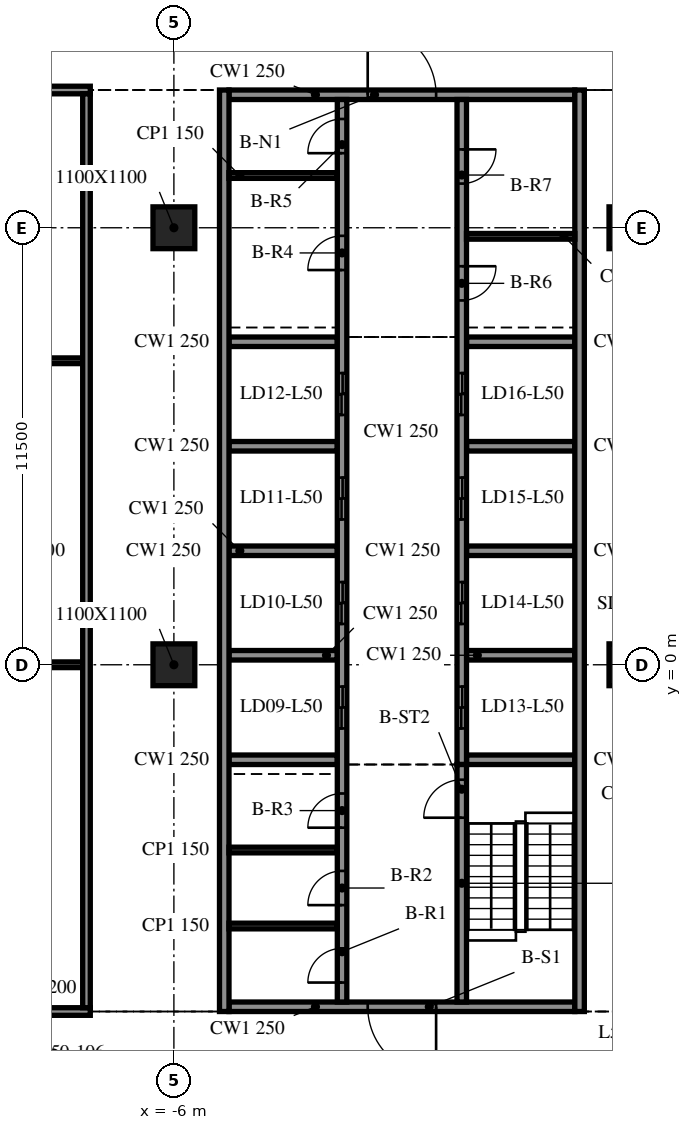
"""IFC4 building model, lengths in metres.
Left out: names, types, materials, properties, quantities, classifications, styles, units other than length and angle.
Written with IfcOpenShell. Run it as: python <this file> out.ifc"""

import sys

from ifc_helpers import new_model, si_unit, direction, frame, frame_2d, origin, origin_2d, place, context, subcontext, project, spatial, rectangle, extrude, element, fill, save


model = new_model("IFC4")
c1 = context("Model", 3, precision=1e-05, world=origin(), true_north=direction((0.0, 1.0)))
c2 = subcontext(c1, "Body", "Model", "MODEL_VIEW")
j1 = project(units=[si_unit("LENGTHUNIT", "METRE"), si_unit("PLANEANGLEUNIT", "RADIAN")], contexts=[c1])
p1 = place(None, origin())
s1 = spatial("IfcSite", under=j1, at=p1, CompositionType="ELEMENT")
p2 = place(p1, origin())
s2 = spatial("IfcBuilding", under=s1, at=p2, CompositionType="ELEMENT")
p3 = place(p2, frame((0.0, 0.0, 209.1)))
s3 = spatial("IfcBuildingStorey", under=s2, at=p3, CompositionType="ELEMENT", Elevation=209.1)
for number, where, z_axis, x_axis in (
    (1, (-6.0, 0.0, -0.34), (0.0, 0.0, 1.0), (1.0, 0.0, 0.0)),
    (2, (-6.0, 11.5, -0.34), (0.0, 0.0, 1.0), (1.0, 0.0, 0.0)),
    (3, (6.0, 0.0, -0.34), (0.0, 0.0, 1.0), (1.0, 0.0, 0.0)),
    (4, (6.0, 11.5, -0.34), (0.0, 0.0, 1.0), (1.0, 0.0, 0.0)),
):
    element("IfcColumn", number, at=place(p3, frame(where, z_axis=z_axis, x_axis=x_axis)), inside=s3, PredefinedType="COLUMN", context=c2, shape_type="SweptSolid", body=[
        extrude(rectangle(XDim=1.1, YDim=1.1, at=origin_2d()), origin(), (0.0, 0.0, 1.0), 3.8),
    ])
for number, where, z_axis, x_axis in (
    (5, (-4.675, 15.125, 0.0), (0.0, 0.0, 1.0), (0.0, -1.0, 0.0)),
    (6, (4.675, -9.125, 0.0), (0.0, 0.0, 1.0), (0.0, 1.0, 0.0)),
):
    element("IfcWall", number, at=place(p3, frame(where, z_axis=z_axis, x_axis=x_axis)), inside=s3, PredefinedType="SOLIDWALL", context=c2, shape_type="SweptSolid", body=[
        extrude(rectangle(XDim=24.25, YDim=0.25, at=frame_2d((12.125, 0.0))), origin(), (0.0, 0.0, 1.0), 3.46),
    ])
p4 = place(p3, frame((4.55, -9.0, 0.0), z_axis=(0.0, 0.0, 1.0), x_axis=(-1.0, 0.0, 0.0)))
e7 = element("IfcWall", 7, at=p4, inside=s3, PredefinedType="SOLIDWALL", context=c2, shape_type="SweptSolid", body=[
    extrude(rectangle(XDim=9.1, YDim=0.25, at=frame_2d((4.55, 0.0))), origin(), (0.0, 0.0, 1.0), 3.46),
])
p5 = place(p4, frame((3.65, 0.0, 0.0)))
e8 = element("IfcOpeningElement", 8, at=p5, cuts=e7, PredefinedType="OPENING", context=c2, shape_type="SweptSolid", body=[
    extrude(rectangle(XDim=1.8, YDim=2.1, at=frame_2d((0.9, 1.05))), frame((0.0, 0.135, 0.0), z_axis=(0.0, -1.0, 0.0), x_axis=(1.0, 0.0, 0.0)), (0.0, 0.0, 1.0), 0.27),
])
p6 = place(p3, frame((-4.55, 15.0, 0.0), z_axis=(0.0, 0.0, 1.0), x_axis=(1.0, 0.0, 0.0)))
e9 = element("IfcWall", 9, at=p6, inside=s3, PredefinedType="SOLIDWALL", context=c2, shape_type="SweptSolid", body=[
    extrude(rectangle(XDim=9.1, YDim=0.25, at=frame_2d((4.55, 0.0))), origin(), (0.0, 0.0, 1.0), 3.46),
])
p7 = place(p6, frame((3.65, 0.0, 0.0)))
e10 = element("IfcOpeningElement", 10, at=p7, cuts=e9, PredefinedType="OPENING", context=c2, shape_type="SweptSolid", body=[
    extrude(rectangle(XDim=1.8, YDim=2.1, at=frame_2d((0.9, 1.05))), frame((0.0, 0.135, 0.0), z_axis=(0.0, -1.0, 0.0), x_axis=(1.0, 0.0, 0.0)), (0.0, 0.0, 1.0), 0.27),
])
p8 = place(p3, frame((-1.575, -8.875, 0.0), z_axis=(0.0, 0.0, 1.0), x_axis=(0.0, 1.0, 0.0)))
e11 = element("IfcWall", 11, at=p8, inside=s3, PredefinedType="SOLIDWALL", context=c2, shape_type="SweptSolid", body=[
    extrude(rectangle(XDim=23.75, YDim=0.25, at=frame_2d((11.875, 0.0))), origin(), (0.0, 0.0, 1.0), 3.46),
])
p9 = place(p8, frame((7.2, 0.0, 0.0)))
e12 = element("IfcOpeningElement", 12, at=p9, cuts=e11, PredefinedType="OPENING", context=c2, shape_type="SweptSolid", body=[
    extrude(rectangle(XDim=1.1, YDim=2.1, at=frame_2d((0.55, 1.05))), frame((0.0, 0.135, 0.0), z_axis=(0.0, -1.0, 0.0), x_axis=(1.0, 0.0, 0.0)), (0.0, 0.0, 1.0), 0.27),
])
p10 = place(p8, frame((9.95, 0.0, 0.0)))
e13 = element("IfcOpeningElement", 13, at=p10, cuts=e11, PredefinedType="OPENING", context=c2, shape_type="SweptSolid", body=[
    extrude(rectangle(XDim=1.1, YDim=2.1, at=frame_2d((0.55, 1.05))), frame((0.0, 0.135, 0.0), z_axis=(0.0, -1.0, 0.0), x_axis=(1.0, 0.0, 0.0)), (0.0, 0.0, 1.0), 0.27),
])
p11 = place(p8, frame((12.7, 0.0, 0.0)))
e14 = element("IfcOpeningElement", 14, at=p11, cuts=e11, PredefinedType="OPENING", context=c2, shape_type="SweptSolid", body=[
    extrude(rectangle(XDim=1.1, YDim=2.1, at=frame_2d((0.55, 1.05))), frame((0.0, 0.135, 0.0), z_axis=(0.0, -1.0, 0.0), x_axis=(1.0, 0.0, 0.0)), (0.0, 0.0, 1.0), 0.27),
])
p12 = place(p8, frame((15.45, 0.0, 0.0)))
e15 = element("IfcOpeningElement", 15, at=p12, cuts=e11, PredefinedType="OPENING", context=c2, shape_type="SweptSolid", body=[
    extrude(rectangle(XDim=1.1, YDim=2.1, at=frame_2d((0.55, 1.05))), frame((0.0, 0.135, 0.0), z_axis=(0.0, -1.0, 0.0), x_axis=(1.0, 0.0, 0.0)), (0.0, 0.0, 1.0), 0.27),
])
p13 = place(p8, frame((0.512, 0.0, 0.0)))
e16 = element("IfcOpeningElement", 16, at=p13, cuts=e11, PredefinedType="OPENING", context=c2, shape_type="SweptSolid", body=[
    extrude(rectangle(XDim=0.9, YDim=2.1, at=frame_2d((0.45, 1.05))), frame((0.0, 0.135, 0.0), z_axis=(0.0, -1.0, 0.0), x_axis=(1.0, 0.0, 0.0)), (0.0, 0.0, 1.0), 0.27),
])
p14 = place(p8, frame((2.55, 0.0, 0.0)))
e17 = element("IfcOpeningElement", 17, at=p14, cuts=e11, PredefinedType="OPENING", context=c2, shape_type="SweptSolid", body=[
    extrude(rectangle(XDim=0.9, YDim=2.1, at=frame_2d((0.45, 1.05))), frame((0.0, 0.135, 0.0), z_axis=(0.0, -1.0, 0.0), x_axis=(1.0, 0.0, 0.0)), (0.0, 0.0, 1.0), 0.27),
])
p15 = place(p8, frame((4.587, 0.0, 0.0)))
e18 = element("IfcOpeningElement", 18, at=p15, cuts=e11, PredefinedType="OPENING", context=c2, shape_type="SweptSolid", body=[
    extrude(rectangle(XDim=0.9, YDim=2.1, at=frame_2d((0.45, 1.05))), frame((0.0, 0.135, 0.0), z_axis=(0.0, -1.0, 0.0), x_axis=(1.0, 0.0, 0.0)), (0.0, 0.0, 1.0), 0.27),
])
p16 = place(p8, frame((19.262, 0.0, 0.0)))
e19 = element("IfcOpeningElement", 19, at=p16, cuts=e11, PredefinedType="OPENING", context=c2, shape_type="SweptSolid", body=[
    extrude(rectangle(XDim=0.9, YDim=2.1, at=frame_2d((0.45, 1.05))), frame((0.0, 0.135, 0.0), z_axis=(0.0, -1.0, 0.0), x_axis=(1.0, 0.0, 0.0)), (0.0, 0.0, 1.0), 0.27),
])
p17 = place(p8, frame((22.337, 0.0, 0.0)))
e20 = element("IfcOpeningElement", 20, at=p17, cuts=e11, PredefinedType="OPENING", context=c2, shape_type="SweptSolid", body=[
    extrude(rectangle(XDim=0.9, YDim=2.1, at=frame_2d((0.45, 1.05))), frame((0.0, 0.135, 0.0), z_axis=(0.0, -1.0, 0.0), x_axis=(1.0, 0.0, 0.0)), (0.0, 0.0, 1.0), 0.27),
])
p18 = place(p3, frame((1.575, -8.875, 0.0), z_axis=(0.0, 0.0, 1.0), x_axis=(0.0, 1.0, 0.0)))
e21 = element("IfcWall", 21, at=p18, inside=s3, PredefinedType="SOLIDWALL", context=c2, shape_type="SweptSolid", body=[
    extrude(rectangle(XDim=6.25, YDim=0.25, at=frame_2d((3.125, 0.0))), origin(), (0.0, 0.0, 1.0), 3.46),
])
p19 = place(p18, frame((4.85, 0.0, 0.0)))
e22 = element("IfcOpeningElement", 22, at=p19, cuts=e21, PredefinedType="OPENING", context=c2, shape_type="SweptSolid", body=[
    extrude(rectangle(XDim=1.0, YDim=2.1, at=frame_2d((0.5, 1.05))), frame((0.0, 0.135, 0.0), z_axis=(0.0, -1.0, 0.0), x_axis=(1.0, 0.0, 0.0)), (0.0, 0.0, 1.0), 0.27),
])
p20 = place(p3, frame((1.575, 14.875, 0.0), z_axis=(0.0, 0.0, 1.0), x_axis=(0.0, -1.0, 0.0)))
e23 = element("IfcWall", 23, at=p20, inside=s3, PredefinedType="SOLIDWALL", context=c2, shape_type="SweptSolid", body=[
    extrude(rectangle(XDim=17.5, YDim=0.25, at=frame_2d((8.75, 0.0))), origin(), (0.0, 0.0, 1.0), 3.46),
])
p21 = place(p20, frame((15.45, 0.0, 0.0)))
e24 = element("IfcOpeningElement", 24, at=p21, cuts=e23, PredefinedType="OPENING", context=c2, shape_type="SweptSolid", body=[
    extrude(rectangle(XDim=1.1, YDim=2.1, at=frame_2d((0.55, 1.05))), frame((0.0, 0.135, 0.0), z_axis=(0.0, -1.0, 0.0), x_axis=(1.0, 0.0, 0.0)), (0.0, 0.0, 1.0), 0.27),
])
p22 = place(p20, frame((12.7, 0.0, 0.0)))
e25 = element("IfcOpeningElement", 25, at=p22, cuts=e23, PredefinedType="OPENING", context=c2, shape_type="SweptSolid", body=[
    extrude(rectangle(XDim=1.1, YDim=2.1, at=frame_2d((0.55, 1.05))), frame((0.0, 0.135, 0.0), z_axis=(0.0, -1.0, 0.0), x_axis=(1.0, 0.0, 0.0)), (0.0, 0.0, 1.0), 0.27),
])
p23 = place(p20, frame((9.95, 0.0, 0.0)))
e26 = element("IfcOpeningElement", 26, at=p23, cuts=e23, PredefinedType="OPENING", context=c2, shape_type="SweptSolid", body=[
    extrude(rectangle(XDim=1.1, YDim=2.1, at=frame_2d((0.55, 1.05))), frame((0.0, 0.135, 0.0), z_axis=(0.0, -1.0, 0.0), x_axis=(1.0, 0.0, 0.0)), (0.0, 0.0, 1.0), 0.27),
])
p24 = place(p20, frame((7.2, 0.0, 0.0)))
e27 = element("IfcOpeningElement", 27, at=p24, cuts=e23, PredefinedType="OPENING", context=c2, shape_type="SweptSolid", body=[
    extrude(rectangle(XDim=1.1, YDim=2.1, at=frame_2d((0.55, 1.05))), frame((0.0, 0.135, 0.0), z_axis=(0.0, -1.0, 0.0), x_axis=(1.0, 0.0, 0.0)), (0.0, 0.0, 1.0), 0.27),
])
p25 = place(p20, frame((4.387, 0.0, 0.0)))
e28 = element("IfcOpeningElement", 28, at=p25, cuts=e23, PredefinedType="OPENING", context=c2, shape_type="SweptSolid", body=[
    extrude(rectangle(XDim=0.9, YDim=2.1, at=frame_2d((0.45, 1.05))), frame((0.0, 0.135, 0.0), z_axis=(0.0, -1.0, 0.0), x_axis=(1.0, 0.0, 0.0)), (0.0, 0.0, 1.0), 0.27),
])
p26 = place(p20, frame((1.312, 0.0, 0.0)))
e29 = element("IfcOpeningElement", 29, at=p26, cuts=e23, PredefinedType="OPENING", context=c2, shape_type="SweptSolid", body=[
    extrude(rectangle(XDim=0.9, YDim=2.1, at=frame_2d((0.45, 1.05))), frame((0.0, 0.135, 0.0), z_axis=(0.0, -1.0, 0.0), x_axis=(1.0, 0.0, 0.0)), (0.0, 0.0, 1.0), 0.27),
])
for number, where, z_axis, x_axis in (
    (30, (-4.55, -2.5, 0.0), (0.0, 0.0, 1.0), (1.0, 0.0, 0.0)),
    (31, (-4.55, 0.25, 0.0), (0.0, 0.0, 1.0), (1.0, 0.0, 0.0)),
    (32, (-4.55, 3.0, 0.0), (0.0, 0.0, 1.0), (1.0, 0.0, 0.0)),
    (33, (-4.55, 5.75, 0.0), (0.0, 0.0, 1.0), (1.0, 0.0, 0.0)),
    (34, (-4.55, 8.5, 0.0), (0.0, 0.0, 1.0), (1.0, 0.0, 0.0)),
    (35, (1.7, -2.5, 0.0), (0.0, 0.0, 1.0), (1.0, 0.0, 0.0)),
    (36, (1.7, 0.25, 0.0), (0.0, 0.0, 1.0), (1.0, 0.0, 0.0)),
    (37, (1.7, 3.0, 0.0), (0.0, 0.0, 1.0), (1.0, 0.0, 0.0)),
    (38, (1.7, 5.75, 0.0), (0.0, 0.0, 1.0), (1.0, 0.0, 0.0)),
    (39, (1.7, 8.5, 0.0), (0.0, 0.0, 1.0), (1.0, 0.0, 0.0)),
):
    element("IfcWall", number, at=place(p3, frame(where, z_axis=z_axis, x_axis=x_axis)), inside=s3, PredefinedType="SOLIDWALL", context=c2, shape_type="SweptSolid", body=[
        extrude(rectangle(XDim=2.85, YDim=0.25, at=frame_2d((1.425, 0.0))), origin(), (0.0, 0.0, 1.0), 3.46),
    ])
for number, where, z_axis, x_axis in (
    (40, (-4.55, -6.875, 0.0), (0.0, 0.0, 1.0), (1.0, 0.0, 0.0)),
    (41, (-4.55, -4.875, 0.0), (0.0, 0.0, 1.0), (1.0, 0.0, 0.0)),
    (42, (-4.55, 12.875, 0.0), (0.0, 0.0, 1.0), (1.0, 0.0, 0.0)),
    (43, (1.7, 11.275, 0.0), (0.0, 0.0, 1.0), (1.0, 0.0, 0.0)),
):
    element("IfcWall", number, at=place(p3, frame(where, z_axis=z_axis, x_axis=x_axis)), inside=s3, PredefinedType="PARTITIONING", context=c2, shape_type="SweptSolid", body=[
        extrude(rectangle(XDim=2.85, YDim=0.15, at=frame_2d((1.425, 0.0))), origin(), (0.0, 0.0, 1.0), 3.46),
    ])
p27 = place(p3, frame((-15.9, -9.125, 0.0), z_axis=(0.0, 0.0, 1.0), x_axis=(1.0, 0.0, 0.0)))
e44 = element("IfcWall", 44, at=p27, inside=s3, PredefinedType="PARTITIONING", context=c2, shape_type="SweptSolid", body=[
    extrude(rectangle(XDim=7.7, YDim=0.2, at=frame_2d((3.85, 0.0))), origin(), (0.0, 0.0, 1.0), 3.46),
])
p28 = place(p27, frame((3.3, 0.0, 0.0)))
e45 = element("IfcOpeningElement", 45, at=p28, cuts=e44, PredefinedType="OPENING", context=c2, shape_type="SweptSolid", body=[
    extrude(rectangle(XDim=0.9, YDim=2.1, at=frame_2d((0.45, 1.05))), frame((0.0, 0.11, 0.0), z_axis=(0.0, -1.0, 0.0), x_axis=(1.0, 0.0, 0.0)), (0.0, 0.0, 1.0), 0.22),
])
for number, where, z_axis, x_axis in (
    (46, (-15.7, 0.0, 0.0), (0.0, 0.0, 1.0), (1.0, 0.0, 0.0)),
    (47, (-15.7, 8.0, 0.0), (0.0, 0.0, 1.0), (1.0, 0.0, 0.0)),
):
    element("IfcWall", number, at=place(p3, frame(where, z_axis=z_axis, x_axis=x_axis)), inside=s3, PredefinedType="PARTITIONING", context=c2, shape_type="SweptSolid", body=[
        extrude(rectangle(XDim=7.3, YDim=0.15, at=frame_2d((3.65, 0.0))), origin(), (0.0, 0.0, 1.0), 3.46),
    ])
p29 = place(p3, frame((-15.9, 15.125, 0.0), z_axis=(0.0, 0.0, 1.0), x_axis=(1.0, 0.0, 0.0)))
e48 = element("IfcWall", 48, at=p29, inside=s3, PredefinedType="PARTITIONING", context=c2, shape_type="SweptSolid", body=[
    extrude(rectangle(XDim=7.7, YDim=0.2, at=frame_2d((3.85, 0.0))), origin(), (0.0, 0.0, 1.0), 3.46),
])
p30 = place(p29, frame((3.3, 0.0, 0.0)))
e49 = element("IfcOpeningElement", 49, at=p30, cuts=e48, PredefinedType="OPENING", context=c2, shape_type="SweptSolid", body=[
    extrude(rectangle(XDim=0.9, YDim=2.1, at=frame_2d((0.45, 1.05))), frame((0.0, 0.11, 0.0), z_axis=(0.0, -1.0, 0.0), x_axis=(1.0, 0.0, 0.0)), (0.0, 0.0, 1.0), 0.22),
])
p31 = place(p3, frame((-8.3, -9.025, 0.0), z_axis=(0.0, 0.0, 1.0), x_axis=(0.0, 1.0, 0.0)))
e50 = element("IfcWall", 50, at=p31, inside=s3, PredefinedType="PARTITIONING", context=c2, shape_type="SweptSolid", body=[
    extrude(rectangle(XDim=24.05, YDim=0.2, at=frame_2d((12.025, 0.0))), origin(), (0.0, 0.0, 1.0), 3.46),
])
p32 = place(p5, origin())
e51 = element("IfcDoor", 51, at=p32, inside=s3, OperationType="DOUBLE_DOOR_SINGLE_SWING", PredefinedType="DOOR", context=c2, shape_type="SweptSolid", body=[
    extrude(rectangle(XDim=1.8, YDim=2.1, at=frame_2d((0.9, 1.05))), frame((0.0, 0.025, 0.0), z_axis=(0.0, -1.0, 0.0), x_axis=(1.0, 0.0, 0.0)), (0.0, 0.0, 1.0), 0.05),
])
fill(e8, e51)
p33 = place(p7, origin())
e52 = element("IfcDoor", 52, at=p33, inside=s3, OperationType="DOUBLE_DOOR_SINGLE_SWING", PredefinedType="DOOR", context=c2, shape_type="SweptSolid", body=[
    extrude(rectangle(XDim=1.8, YDim=2.1, at=frame_2d((0.9, 1.05))), frame((0.0, 0.025, 0.0), z_axis=(0.0, -1.0, 0.0), x_axis=(1.0, 0.0, 0.0)), (0.0, 0.0, 1.0), 0.05),
])
fill(e10, e52)
p34 = place(p21, origin())
e53 = element("IfcDoor", 53, at=p34, inside=s3, OperationType="DOUBLE_DOOR_SLIDING", PredefinedType="DOOR", context=c2, shape_type="SweptSolid", body=[
    extrude(rectangle(XDim=1.1, YDim=2.1, at=frame_2d((0.55, 1.05))), frame((0.0, 0.025, 0.0), z_axis=(0.0, -1.0, 0.0), x_axis=(1.0, 0.0, 0.0)), (0.0, 0.0, 1.0), 0.05),
])
fill(e24, e53)
p35 = place(p22, origin())
e54 = element("IfcDoor", 54, at=p35, inside=s3, OperationType="DOUBLE_DOOR_SLIDING", PredefinedType="DOOR", context=c2, shape_type="SweptSolid", body=[
    extrude(rectangle(XDim=1.1, YDim=2.1, at=frame_2d((0.55, 1.05))), frame((0.0, 0.025, 0.0), z_axis=(0.0, -1.0, 0.0), x_axis=(1.0, 0.0, 0.0)), (0.0, 0.0, 1.0), 0.05),
])
fill(e25, e54)
p36 = place(p23, origin())
e55 = element("IfcDoor", 55, at=p36, inside=s3, OperationType="DOUBLE_DOOR_SLIDING", PredefinedType="DOOR", context=c2, shape_type="SweptSolid", body=[
    extrude(rectangle(XDim=1.1, YDim=2.1, at=frame_2d((0.55, 1.05))), frame((0.0, 0.025, 0.0), z_axis=(0.0, -1.0, 0.0), x_axis=(1.0, 0.0, 0.0)), (0.0, 0.0, 1.0), 0.05),
])
fill(e26, e55)
p37 = place(p24, origin())
e56 = element("IfcDoor", 56, at=p37, inside=s3, OperationType="DOUBLE_DOOR_SLIDING", PredefinedType="DOOR", context=c2, shape_type="SweptSolid", body=[
    extrude(rectangle(XDim=1.1, YDim=2.1, at=frame_2d((0.55, 1.05))), frame((0.0, 0.025, 0.0), z_axis=(0.0, -1.0, 0.0), x_axis=(1.0, 0.0, 0.0)), (0.0, 0.0, 1.0), 0.05),
])
fill(e27, e56)
p38 = place(p9, origin())
e57 = element("IfcDoor", 57, at=p38, inside=s3, OperationType="DOUBLE_DOOR_SLIDING", PredefinedType="DOOR", context=c2, shape_type="SweptSolid", body=[
    extrude(rectangle(XDim=1.1, YDim=2.1, at=frame_2d((0.55, 1.05))), frame((0.0, 0.025, 0.0), z_axis=(0.0, -1.0, 0.0), x_axis=(1.0, 0.0, 0.0)), (0.0, 0.0, 1.0), 0.05),
])
fill(e12, e57)
p39 = place(p10, origin())
e58 = element("IfcDoor", 58, at=p39, inside=s3, OperationType="DOUBLE_DOOR_SLIDING", PredefinedType="DOOR", context=c2, shape_type="SweptSolid", body=[
    extrude(rectangle(XDim=1.1, YDim=2.1, at=frame_2d((0.55, 1.05))), frame((0.0, 0.025, 0.0), z_axis=(0.0, -1.0, 0.0), x_axis=(1.0, 0.0, 0.0)), (0.0, 0.0, 1.0), 0.05),
])
fill(e13, e58)
p40 = place(p11, origin())
e59 = element("IfcDoor", 59, at=p40, inside=s3, OperationType="DOUBLE_DOOR_SLIDING", PredefinedType="DOOR", context=c2, shape_type="SweptSolid", body=[
    extrude(rectangle(XDim=1.1, YDim=2.1, at=frame_2d((0.55, 1.05))), frame((0.0, 0.025, 0.0), z_axis=(0.0, -1.0, 0.0), x_axis=(1.0, 0.0, 0.0)), (0.0, 0.0, 1.0), 0.05),
])
fill(e14, e59)
p41 = place(p12, origin())
e60 = element("IfcDoor", 60, at=p41, inside=s3, OperationType="DOUBLE_DOOR_SLIDING", PredefinedType="DOOR", context=c2, shape_type="SweptSolid", body=[
    extrude(rectangle(XDim=1.1, YDim=2.1, at=frame_2d((0.55, 1.05))), frame((0.0, 0.025, 0.0), z_axis=(0.0, -1.0, 0.0), x_axis=(1.0, 0.0, 0.0)), (0.0, 0.0, 1.0), 0.05),
])
fill(e15, e60)
p42 = place(p13, origin())
e61 = element("IfcDoor", 61, at=p42, inside=s3, OperationType="SINGLE_SWING_LEFT", PredefinedType="DOOR", context=c2, shape_type="SweptSolid", body=[
    extrude(rectangle(XDim=0.9, YDim=2.1, at=frame_2d((0.45, 1.05))), frame((0.0, 0.025, 0.0), z_axis=(0.0, -1.0, 0.0), x_axis=(1.0, 0.0, 0.0)), (0.0, 0.0, 1.0), 0.05),
])
fill(e16, e61)
p43 = place(p14, origin())
e62 = element("IfcDoor", 62, at=p43, inside=s3, OperationType="SINGLE_SWING_RIGHT", PredefinedType="DOOR", context=c2, shape_type="SweptSolid", body=[
    extrude(rectangle(XDim=0.9, YDim=2.1, at=frame_2d((0.45, 1.05))), frame((0.0, 0.025, 0.0), z_axis=(0.0, -1.0, 0.0), x_axis=(1.0, 0.0, 0.0)), (0.0, 0.0, 1.0), 0.05),
])
fill(e17, e62)
p44 = place(p15, origin())
e63 = element("IfcDoor", 63, at=p44, inside=s3, OperationType="SINGLE_SWING_LEFT", PredefinedType="DOOR", context=c2, shape_type="SweptSolid", body=[
    extrude(rectangle(XDim=0.9, YDim=2.1, at=frame_2d((0.45, 1.05))), frame((0.0, 0.025, 0.0), z_axis=(0.0, -1.0, 0.0), x_axis=(1.0, 0.0, 0.0)), (0.0, 0.0, 1.0), 0.05),
])
fill(e18, e63)
p45 = place(p16, origin())
e64 = element("IfcDoor", 64, at=p45, inside=s3, OperationType="SINGLE_SWING_RIGHT", PredefinedType="DOOR", context=c2, shape_type="SweptSolid", body=[
    extrude(rectangle(XDim=0.9, YDim=2.1, at=frame_2d((0.45, 1.05))), frame((0.0, 0.025, 0.0), z_axis=(0.0, -1.0, 0.0), x_axis=(1.0, 0.0, 0.0)), (0.0, 0.0, 1.0), 0.05),
])
fill(e19, e64)
p46 = place(p17, origin())
e65 = element("IfcDoor", 65, at=p46, inside=s3, OperationType="SINGLE_SWING_LEFT", PredefinedType="DOOR", context=c2, shape_type="SweptSolid", body=[
    extrude(rectangle(XDim=0.9, YDim=2.1, at=frame_2d((0.45, 1.05))), frame((0.0, 0.025, 0.0), z_axis=(0.0, -1.0, 0.0), x_axis=(1.0, 0.0, 0.0)), (0.0, 0.0, 1.0), 0.05),
])
fill(e20, e65)
p47 = place(p25, origin())
e66 = element("IfcDoor", 66, at=p47, inside=s3, OperationType="SINGLE_SWING_RIGHT", PredefinedType="DOOR", context=c2, shape_type="SweptSolid", body=[
    extrude(rectangle(XDim=0.9, YDim=2.1, at=frame_2d((0.45, 1.05))), frame((0.0, 0.025, 0.0), z_axis=(0.0, -1.0, 0.0), x_axis=(1.0, 0.0, 0.0)), (0.0, 0.0, 1.0), 0.05),
])
fill(e28, e66)
p48 = place(p26, origin())
e67 = element("IfcDoor", 67, at=p48, inside=s3, OperationType="SINGLE_SWING_LEFT", PredefinedType="DOOR", context=c2, shape_type="SweptSolid", body=[
    extrude(rectangle(XDim=0.9, YDim=2.1, at=frame_2d((0.45, 1.05))), frame((0.0, 0.025, 0.0), z_axis=(0.0, -1.0, 0.0), x_axis=(1.0, 0.0, 0.0)), (0.0, 0.0, 1.0), 0.05),
])
fill(e29, e67)
p49 = place(p19, origin())
e68 = element("IfcDoor", 68, at=p49, inside=s3, OperationType="SINGLE_SWING_RIGHT", PredefinedType="DOOR", context=c2, shape_type="SweptSolid", body=[
    extrude(rectangle(XDim=1.0, YDim=2.1, at=frame_2d((0.5, 1.05))), frame((0.0, 0.025, 0.0), z_axis=(0.0, -1.0, 0.0), x_axis=(1.0, 0.0, 0.0)), (0.0, 0.0, 1.0), 0.05),
])
fill(e22, e68)
save(model, sys.argv[1])
